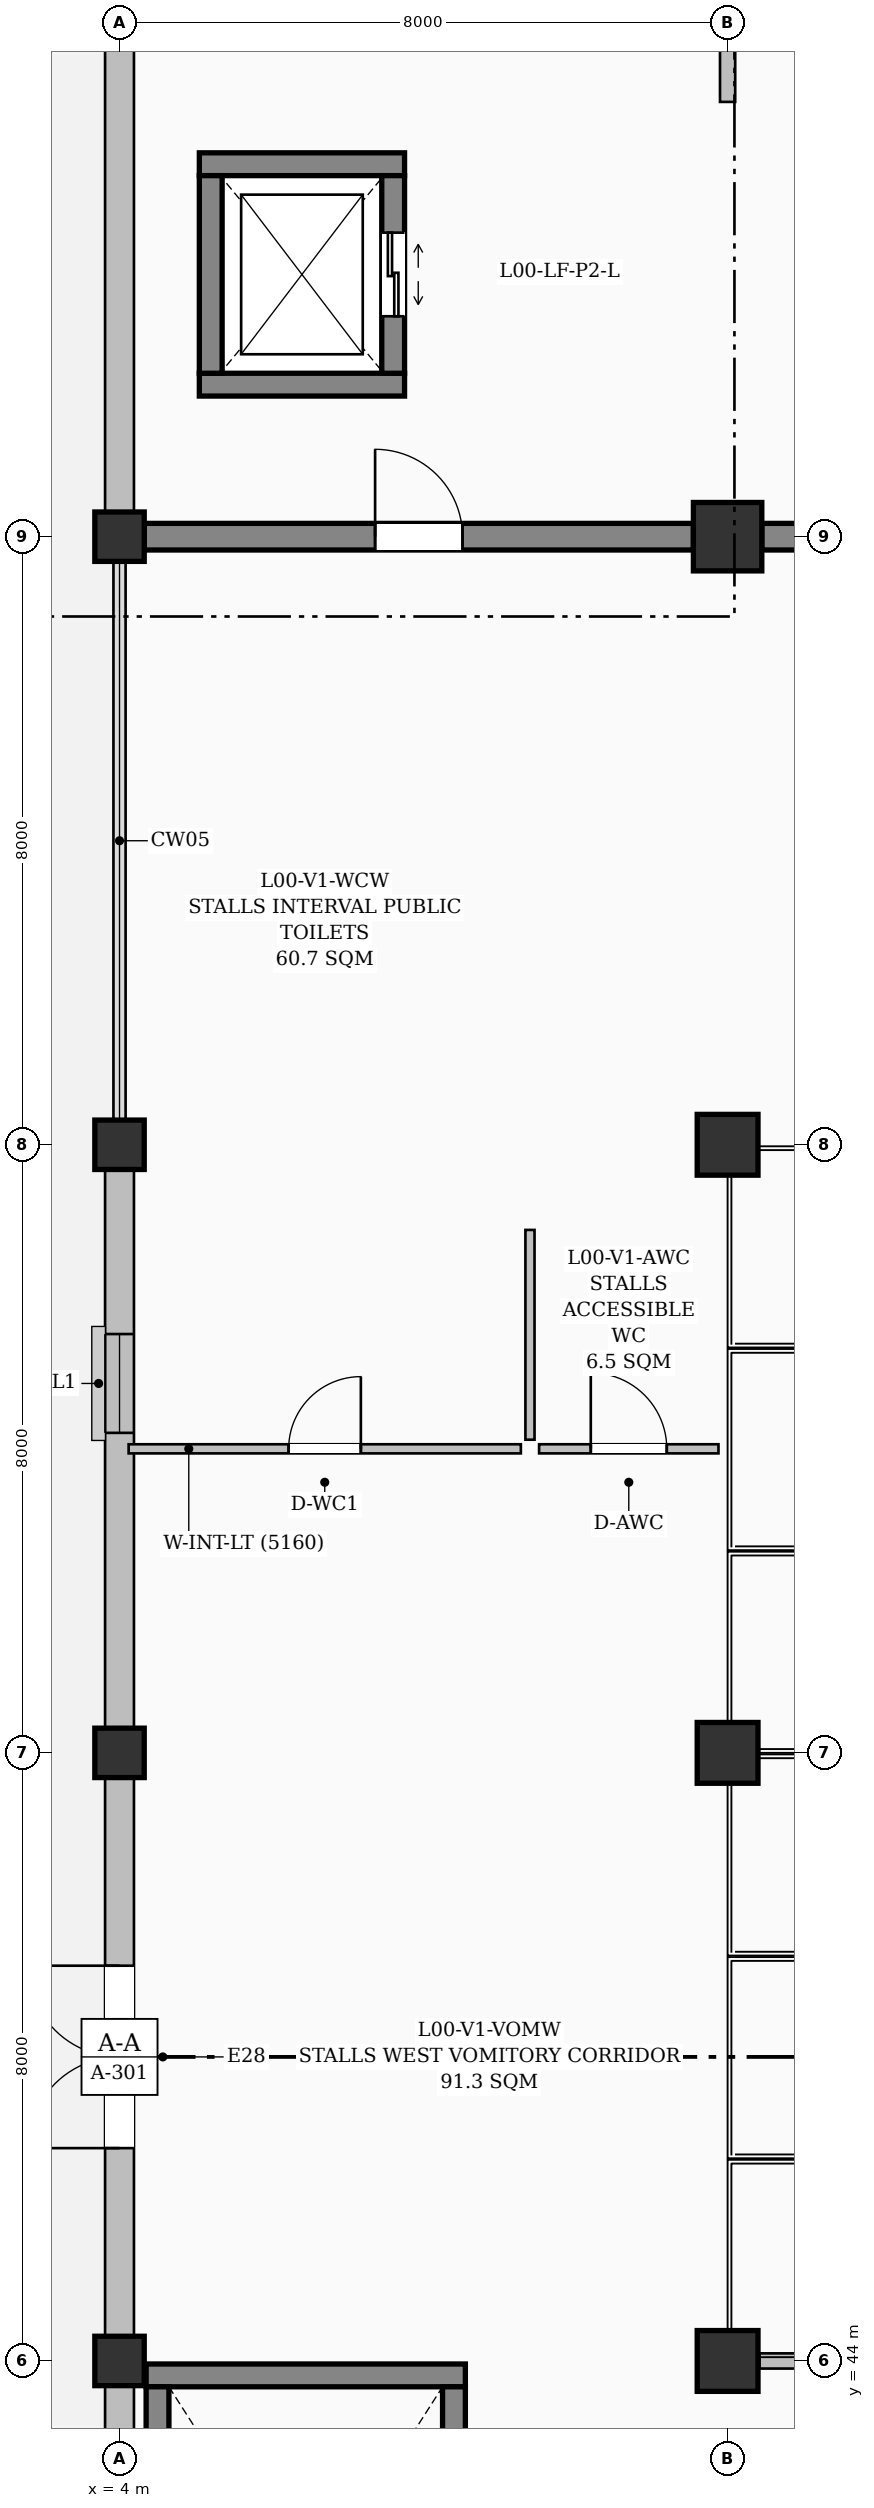
"""IFC4 building model, lengths in metres.
Left out: names, types, materials, properties, quantities, classifications, styles, units other than length and angle.
Written with IfcOpenShell. Run it as: python <this file> out.ifc"""

import sys

from ifc_helpers import new_model, si_unit, direction, frame, frame_2d, origin, origin_2d, place, context, subcontext, project, spatial, rectangle, extrude, element, fill, save


model = new_model("IFC4")
c1 = context("Model", 3, precision=1e-05, world=origin(), true_north=direction((0.0, 1.0)))
c2 = subcontext(c1, "Body", "Model", "MODEL_VIEW")
j1 = project(units=[si_unit("LENGTHUNIT", "METRE"), si_unit("PLANEANGLEUNIT", "RADIAN")], contexts=[c1])
p1 = place(None, origin())
s1 = spatial("IfcSite", under=j1, at=p1, CompositionType="ELEMENT")
p2 = place(p1, origin())
s2 = spatial("IfcBuilding", under=s1, at=p2, CompositionType="ELEMENT")
p3 = place(p2, origin())
s3 = spatial("IfcBuildingStorey", under=s2, at=p3, CompositionType="ELEMENT", Elevation=0.0)
for number, where, z_axis, x_axis in (
    (1, (4.0, 44.0, 0.0), (0.0, 0.0, 1.0), (1.0, 0.0, 0.0)),
    (2, (4.0, 52.0, 0.0), (0.0, 0.0, 1.0), (1.0, 0.0, 0.0)),
    (3, (4.0, 60.0, 0.0), (0.0, 0.0, 1.0), (1.0, 0.0, 0.0)),
    (4, (4.0, 68.0, 0.0), (0.0, 0.0, 1.0), (1.0, 0.0, 0.0)),
):
    element("IfcColumn", number, at=place(p3, frame(where, z_axis=z_axis, x_axis=x_axis)), inside=s3, PredefinedType="COLUMN", context=c2, shape_type="SweptSolid", body=[
        extrude(rectangle(XDim=0.65, YDim=0.65, at=origin_2d()), origin(), (0.0, 0.0, 1.0), 4.8),
    ])
for number, where, z_axis, x_axis in (
    (5, (12.0, 44.0, 0.0), (0.0, 0.0, 1.0), (1.0, 0.0, 0.0)),
    (6, (12.0, 52.0, 0.0), (0.0, 0.0, 1.0), (1.0, 0.0, 0.0)),
    (7, (12.0, 60.0, 0.0), (0.0, 0.0, 1.0), (1.0, 0.0, 0.0)),
):
    element("IfcColumn", number, at=place(p3, frame(where, z_axis=z_axis, x_axis=x_axis)), inside=s3, PredefinedType="COLUMN", context=c2, shape_type="SweptSolid", body=[
        extrude(rectangle(XDim=0.8, YDim=0.8, at=origin_2d()), origin(), (0.0, 0.0, 1.0), 4.8),
    ])
p4 = place(p3, frame((12.0, 68.0, 0.0), z_axis=(0.0, 0.0, 1.0), x_axis=(1.0, 0.0, 0.0)))
e8 = element("IfcColumn", 8, at=p4, inside=s3, PredefinedType="COLUMN", context=c2, shape_type="SweptSolid", body=[
    extrude(rectangle(XDim=0.9, YDim=0.9, at=origin_2d()), origin(), (0.0, 0.0, 1.0), 4.8),
])
p5 = place(p3, frame((4.325, 68.0, 0.0), z_axis=(0.0, 0.0, 1.0), x_axis=(1.0, 0.0, 0.0)))
e9 = element("IfcWall", 9, at=p5, inside=s3, PredefinedType="SHEAR", context=c2, shape_type="SweptSolid", body=[
    extrude(rectangle(XDim=7.225, YDim=0.35, at=frame_2d((3.613, 0.0))), origin(), (0.0, 0.0, 1.0), 4.55),
])
p6 = place(p5, frame((3.038, 0.0, 0.0)))
e10 = element("IfcOpeningElement", 10, at=p6, cuts=e9, PredefinedType="OPENING", context=c2, shape_type="SweptSolid", body=[
    extrude(rectangle(XDim=1.15, YDim=2.15, at=frame_2d((0.575, 1.075))), frame((0.0, 0.185, 0.0), z_axis=(0.0, -1.0, 0.0), x_axis=(1.0, 0.0, 0.0)), (0.0, 0.0, 1.0), 0.37),
])
p7 = place(p3, frame((12.45, 68.0, 0.0), z_axis=(0.0, 0.0, 1.0), x_axis=(1.0, 0.0, 0.0)))
e11 = element("IfcWall", 11, at=p7, inside=s3, PredefinedType="SHEAR", context=c2, shape_type="SweptSolid", body=[
    extrude(rectangle(XDim=7.1, YDim=0.35, at=frame_2d((3.55, 0.0))), origin(), (0.0, 0.0, 1.0), 4.55),
])
p8 = place(p3, frame((4.0, 36.325, 0.0), z_axis=(0.0, 0.0, 1.0), x_axis=(0.0, 1.0, 0.0)))
e12 = element("IfcWall", 12, at=p8, inside=s3, PredefinedType="SOLIDWALL", context=c2, shape_type="SweptSolid", body=[
    extrude(rectangle(XDim=7.35, YDim=0.38, at=frame_2d((3.675, 0.0))), origin(), (0.0, 0.0, 1.0), 3.985),
])
p9 = place(p8, frame((3.075, 0.0, 0.95)))
e13 = element("IfcOpeningElement", 13, at=p9, cuts=e12, PredefinedType="OPENING", context=c2, shape_type="SweptSolid", body=[
    extrude(rectangle(XDim=1.2, YDim=1.5, at=frame_2d((0.6, 0.75))), frame((0.0, 0.2, 0.0), z_axis=(0.0, -1.0, 0.0), x_axis=(1.0, 0.0, 0.0)), (0.0, 0.0, 1.0), 0.4),
])
p10 = place(p3, frame((4.0, 44.325, 0.0), z_axis=(0.0, 0.0, 1.0), x_axis=(0.0, 1.0, 0.0)))
e14 = element("IfcWall", 14, at=p10, inside=s3, PredefinedType="SOLIDWALL", context=c2, shape_type="SweptSolid", body=[
    extrude(rectangle(XDim=7.35, YDim=0.38, at=frame_2d((3.675, 0.0))), origin(), (0.0, 0.0, 1.0), 3.935),
])
p11 = place(p10, frame((2.475, 0.0, 0.0)))
e15 = element("IfcOpeningElement", 15, at=p11, cuts=e14, PredefinedType="OPENING", context=c2, shape_type="SweptSolid", body=[
    extrude(rectangle(XDim=2.4, YDim=2.4, at=frame_2d((1.2, 1.2))), frame((0.0, 0.2, 0.0), z_axis=(0.0, -1.0, 0.0), x_axis=(1.0, 0.0, 0.0)), (0.0, 0.0, 1.0), 0.4),
])
p12 = place(p3, frame((4.0, 52.325, 0.0), z_axis=(0.0, 0.0, 1.0), x_axis=(0.0, 1.0, 0.0)))
e16 = element("IfcWall", 16, at=p12, inside=s3, PredefinedType="SOLIDWALL", context=c2, shape_type="SweptSolid", body=[
    extrude(rectangle(XDim=7.35, YDim=0.38, at=frame_2d((3.675, 0.0))), origin(), (0.0, 0.0, 1.0), 4.235),
])
p13 = place(p12, frame((3.885, 0.0, 0.95)))
e17 = element("IfcOpeningElement", 17, at=p13, cuts=e16, PredefinedType="OPENING", context=c2, shape_type="SweptSolid", body=[
    extrude(rectangle(XDim=1.3, YDim=1.4, at=frame_2d((0.65, 0.7))), frame((0.0, 0.2, 0.0), z_axis=(0.0, -1.0, 0.0), x_axis=(1.0, 0.0, 0.0)), (0.0, 0.0, 1.0), 0.4),
])
p14 = place(p3, frame((4.0, 68.325, 0.0), z_axis=(0.0, 0.0, 1.0), x_axis=(0.0, 1.0, 0.0)))
e18 = element("IfcWall", 18, at=p14, inside=s3, PredefinedType="SOLIDWALL", context=c2, shape_type="SweptSolid", body=[
    extrude(rectangle(XDim=7.35, YDim=0.38, at=frame_2d((3.675, 0.0))), origin(), (0.0, 0.0, 1.0), 3.935),
])
p15 = place(p3, frame((8.55, 43.81, 0.0), z_axis=(0.0, 0.0, 1.0), x_axis=(-1.0, 0.0, 0.0)))
e19 = element("IfcWall", 19, at=p15, inside=s3, PredefinedType="SHEAR", context=c2, shape_type="SweptSolid", body=[
    extrude(rectangle(XDim=4.2, YDim=0.3, at=frame_2d((2.1, 0.0))), origin(), (0.0, 0.0, 1.0), 4.55),
])
p16 = place(p3, frame((4.5, 36.34, 0.0), z_axis=(0.0, 0.0, 1.0), x_axis=(0.0, 1.0, 0.0)))
e20 = element("IfcWall", 20, at=p16, inside=s3, PredefinedType="SHEAR", context=c2, shape_type="SweptSolid", body=[
    extrude(rectangle(XDim=7.32, YDim=0.3, at=frame_2d((3.66, 0.0))), origin(), (0.0, 0.0, 1.0), 4.55),
])
p17 = place(p3, frame((8.4, 43.66, 0.0), z_axis=(0.0, 0.0, 1.0), x_axis=(0.0, -1.0, 0.0)))
e21 = element("IfcWall", 21, at=p17, inside=s3, PredefinedType="SHEAR", context=c2, shape_type="SweptSolid", body=[
    extrude(rectangle(XDim=7.32, YDim=0.3, at=frame_2d((3.66, 0.0))), origin(), (0.0, 0.0, 1.0), 4.55),
])
p18 = place(p17, frame((5.77, 0.0, 0.0)))
e22 = element("IfcOpeningElement", 22, at=p18, cuts=e21, PredefinedType="OPENING", context=c2, shape_type="SweptSolid", body=[
    extrude(rectangle(XDim=1.2, YDim=2.15, at=frame_2d((0.6, 1.075))), frame((0.0, 0.16, 0.0), z_axis=(0.0, -1.0, 0.0), x_axis=(1.0, 0.0, 0.0)), (0.0, 0.0, 1.0), 0.32),
])
for number, where, z_axis, x_axis in (
    (23, (5.05, 70.0, 0.0), (0.0, 0.0, 1.0), (1.0, 0.0, 0.0)),
    (24, (7.75, 72.9, 0.0), (0.0, 0.0, 1.0), (-1.0, 0.0, 0.0)),
):
    element("IfcWall", number, at=place(p3, frame(where, z_axis=z_axis, x_axis=x_axis)), inside=s3, PredefinedType="SHEAR", context=c2, shape_type="SweptSolid", body=[
        extrude(rectangle(XDim=2.7, YDim=0.3, at=frame_2d((1.35, 0.0))), origin(), (0.0, 0.0, 1.0), 4.55),
    ])
p19 = place(p3, frame((5.2, 70.15, 0.0), z_axis=(0.0, 0.0, 1.0), x_axis=(0.0, 1.0, 0.0)))
e25 = element("IfcWall", 25, at=p19, inside=s3, PredefinedType="SHEAR", context=c2, shape_type="SweptSolid", body=[
    extrude(rectangle(XDim=2.6, YDim=0.3, at=frame_2d((1.3, 0.0))), origin(), (0.0, 0.0, 1.0), 4.55),
])
p20 = place(p3, frame((7.6, 72.75, 0.0), z_axis=(0.0, 0.0, 1.0), x_axis=(0.0, -1.0, 0.0)))
e26 = element("IfcWall", 26, at=p20, inside=s3, PredefinedType="SHEAR", context=c2, shape_type="SweptSolid", body=[
    extrude(rectangle(XDim=2.6, YDim=0.3, at=frame_2d((1.3, 0.0))), origin(), (0.0, 0.0, 1.0), 4.55),
])
p21 = place(p20, frame((0.75, 0.0, 0.0)))
e27 = element("IfcOpeningElement", 27, at=p21, cuts=e26, PredefinedType="OPENING", context=c2, shape_type="SweptSolid", body=[
    extrude(rectangle(XDim=1.1, YDim=2.15, at=frame_2d((0.55, 1.075))), frame((0.0, 0.16, 0.0), z_axis=(0.0, -1.0, 0.0), x_axis=(1.0, 0.0, 0.0)), (0.0, 0.0, 1.0), 0.32),
])
p22 = place(p3, frame((12.42, 44.0, 0.0), z_axis=(0.0, 0.0, 1.0), x_axis=(1.0, 0.0, 0.0)))
e28 = element("IfcWall", 28, at=p22, inside=s3, PredefinedType="PARTITIONING", context=c2, shape_type="SweptSolid", body=[
    extrude(rectangle(XDim=31.16, YDim=0.2, at=frame_2d((15.58, 0.0))), origin(), (0.0, 0.0, 1.0), 3.685),
])
p23 = place(p22, frame((10.941, 0.0, 0.0)))
e29 = element("IfcOpeningElement", 29, at=p23, cuts=e28, PredefinedType="OPENING", context=c2, shape_type="SweptSolid", body=[
    extrude(rectangle(XDim=1.8, YDim=2.35, at=frame_2d((0.9, 1.175))), frame((0.0, 0.11, 0.0), z_axis=(0.0, -1.0, 0.0), x_axis=(1.0, 0.0, 0.0)), (0.0, 0.0, 1.0), 0.22),
])
p24 = place(p3, frame((4.12, 56.0, 0.0), z_axis=(0.0, 0.0, 1.0), x_axis=(1.0, 0.0, 0.0)))
e30 = element("IfcWall", 30, at=p24, inside=s3, PredefinedType="PARTITIONING", context=c2, shape_type="SweptSolid", body=[
    extrude(rectangle(XDim=5.16, YDim=0.12, at=frame_2d((2.58, 0.0))), origin(), (0.0, 0.0, 1.0), 4.55),
])
p25 = place(p24, frame((2.105, 0.0, 0.0)))
e31 = element("IfcOpeningElement", 31, at=p25, cuts=e30, PredefinedType="OPENING", context=c2, shape_type="SweptSolid", body=[
    extrude(rectangle(XDim=0.95, YDim=2.1, at=frame_2d((0.475, 1.05))), frame((0.0, 0.07, 0.0), z_axis=(0.0, -1.0, 0.0), x_axis=(1.0, 0.0, 0.0)), (0.0, 0.0, 1.0), 0.14),
])
p26 = place(p3, frame((9.52, 56.0, 0.0), z_axis=(0.0, 0.0, 1.0), x_axis=(1.0, 0.0, 0.0)))
e32 = element("IfcWall", 32, at=p26, inside=s3, PredefinedType="PARTITIONING", context=c2, shape_type="SweptSolid", body=[
    extrude(rectangle(XDim=2.36, YDim=0.12, at=frame_2d((1.18, 0.0))), origin(), (0.0, 0.0, 1.0), 4.55),
])
p27 = place(p26, frame((0.68, 0.0, 0.0)))
e33 = element("IfcOpeningElement", 33, at=p27, cuts=e32, PredefinedType="OPENING", context=c2, shape_type="SweptSolid", body=[
    extrude(rectangle(XDim=1.0, YDim=2.1, at=frame_2d((0.5, 1.05))), frame((0.0, 0.07, 0.0), z_axis=(0.0, -1.0, 0.0), x_axis=(1.0, 0.0, 0.0)), (0.0, 0.0, 1.0), 0.14),
])
p28 = place(p3, frame((9.4, 56.12, 0.0), z_axis=(0.0, 0.0, 1.0), x_axis=(0.0, 1.0, 0.0)))
e34 = element("IfcWall", 34, at=p28, inside=s3, PredefinedType="PARTITIONING", context=c2, shape_type="SweptSolid", body=[
    extrude(rectangle(XDim=2.76, YDim=0.12, at=frame_2d((1.38, 0.0))), origin(), (0.0, 0.0, 1.0), 4.55),
])
p29 = place(p3, frame((12.0, 73.72, 0.0), z_axis=(0.0, 0.0, 1.0), x_axis=(0.0, 1.0, 0.0)))
e35 = element("IfcWall", 35, at=p29, inside=s3, PredefinedType="PARTITIONING", context=c2, shape_type="SweptSolid", body=[
    extrude(rectangle(XDim=8.16, YDim=0.2, at=frame_2d((4.08, 0.0))), origin(), (0.0, 0.0, 1.0), 4.145),
])
p30 = place(p29, frame((4.159, 0.0, 0.0)))
e36 = element("IfcOpeningElement", 36, at=p30, cuts=e35, PredefinedType="OPENING", context=c2, shape_type="SweptSolid", body=[
    extrude(rectangle(XDim=1.8, YDim=2.35, at=frame_2d((0.9, 1.175))), frame((0.0, 0.11, 0.0), z_axis=(0.0, -1.0, 0.0), x_axis=(1.0, 0.0, 0.0)), (0.0, 0.0, 1.0), 0.22),
])
p31 = place(p11, origin())
e37 = element("IfcDoor", 37, at=p31, inside=s3, OperationType="DOUBLE_DOOR_SINGLE_SWING", PredefinedType="DOOR", context=c2, shape_type="SweptSolid", body=[
    extrude(rectangle(XDim=2.4, YDim=2.4, at=frame_2d((1.2, 1.2))), frame((0.0, 0.025, 0.0), z_axis=(0.0, -1.0, 0.0), x_axis=(1.0, 0.0, 0.0)), (0.0, 0.0, 1.0), 0.05),
])
fill(e15, e37)
p32 = place(p13, origin())
e38 = element("IfcWindow", 38, at=p32, inside=s3, PartitioningType="SINGLE_PANEL", PredefinedType="WINDOW", context=c2, shape_type="SweptSolid", body=[
    extrude(rectangle(XDim=1.3, YDim=1.4, at=frame_2d((0.65, 0.7))), frame((0.0, 0.03, 0.0), z_axis=(0.0, -1.0, 0.0), x_axis=(1.0, 0.0, 0.0)), (0.0, 0.0, 1.0), 0.06),
])
fill(e17, e38)
p33 = place(p21, origin())
e39 = element("IfcDoor", 39, at=p33, inside=s3, OperationType="DOUBLE_DOOR_SLIDING", PredefinedType="DOOR", context=c2, shape_type="SweptSolid", body=[
    extrude(rectangle(XDim=1.1, YDim=2.15, at=frame_2d((0.55, 1.075))), frame((0.0, 0.025, 0.0), z_axis=(0.0, -1.0, 0.0), x_axis=(1.0, 0.0, 0.0)), (0.0, 0.0, 1.0), 0.05),
])
fill(e27, e39)
p34 = place(p25, origin())
e40 = element("IfcDoor", 40, at=p34, inside=s3, OperationType="SINGLE_SWING_RIGHT", PredefinedType="DOOR", context=c2, shape_type="SweptSolid", body=[
    extrude(rectangle(XDim=0.95, YDim=2.1, at=frame_2d((0.475, 1.05))), frame((0.0, 0.025, 0.0), z_axis=(0.0, -1.0, 0.0), x_axis=(1.0, 0.0, 0.0)), (0.0, 0.0, 1.0), 0.05),
])
fill(e31, e40)
p35 = place(p27, origin())
e41 = element("IfcDoor", 41, at=p35, inside=s3, OperationType="SINGLE_SWING_LEFT", PredefinedType="DOOR", context=c2, shape_type="SweptSolid", body=[
    extrude(rectangle(XDim=1.0, YDim=2.1, at=frame_2d((0.5, 1.05))), frame((0.0, 0.025, 0.0), z_axis=(0.0, -1.0, 0.0), x_axis=(1.0, 0.0, 0.0)), (0.0, 0.0, 1.0), 0.05),
])
fill(e33, e41)
p36 = place(p6, origin())
e42 = element("IfcDoor", 42, at=p36, inside=s3, OperationType="SINGLE_SWING_LEFT", PredefinedType="DOOR", context=c2, shape_type="SweptSolid", body=[
    extrude(rectangle(XDim=1.15, YDim=2.15, at=frame_2d((0.575, 1.075))), frame((0.0, 0.025, 0.0), z_axis=(0.0, -1.0, 0.0), x_axis=(1.0, 0.0, 0.0)), (0.0, 0.0, 1.0), 0.05),
])
fill(e10, e42)
save(model, sys.argv[1])
